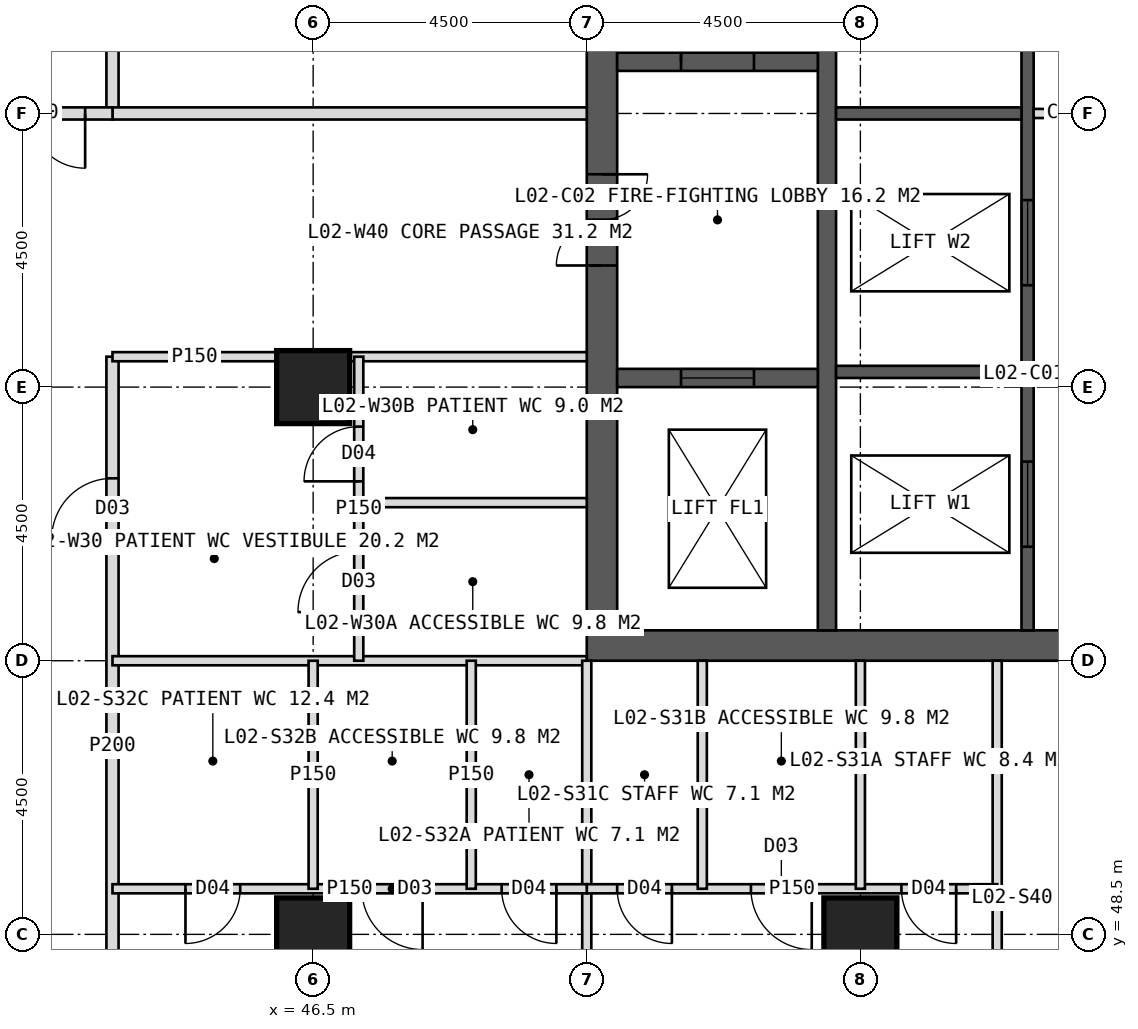
"""IFC4 building model, lengths in metres.
Left out: names, types, materials, properties, quantities, classifications, styles, units other than length and angle.
Written with IfcOpenShell. Run it as: python <this file> out.ifc"""

import sys

from ifc_helpers import new_model, si_unit, direction, frame, frame_2d, origin, origin_2d, place, context, subcontext, project, spatial, rectangle, hollow_rectangle, extrude, element, fill, save


model = new_model("IFC4")
c1 = context("Model", 3, precision=1e-05, world=origin(), true_north=direction((0.0, 1.0)))
c2 = subcontext(c1, "Body", "Model", "MODEL_VIEW")
j1 = project(units=[si_unit("LENGTHUNIT", "METRE"), si_unit("PLANEANGLEUNIT", "RADIAN")], contexts=[c1])
p1 = place(None, origin())
s1 = spatial("IfcSite", under=j1, at=p1, CompositionType="ELEMENT")
p2 = place(p1, origin())
s2 = spatial("IfcBuilding", under=s1, at=p2, CompositionType="ELEMENT")
p3 = place(p2, frame((0.0, 0.0, 11.0)))
s3 = spatial("IfcBuildingStorey", under=s2, at=p3, CompositionType="ELEMENT", Elevation=11.0)
p4 = place(p3, frame((51.0, 53.25, 0.0), z_axis=(0.0, 0.0, 1.0), x_axis=(1.0, 0.0, 0.0)))
e1 = element("IfcWall", 1, at=p4, inside=s3, PredefinedType="SHEAR", context=c2, shape_type="SweptSolid", body=[
    extrude(rectangle(XDim=18.0, YDim=0.5, at=frame_2d((9.0, 0.0))), origin(), (0.0, 0.0, 1.0), 5.5),
])
p5 = place(p4, frame((8.1, 0.0, 0.0)))
e2 = element("IfcOpeningElement", 2, at=p5, cuts=e1, PredefinedType="OPENING", context=c2, shape_type="SweptSolid", body=[
    extrude(rectangle(XDim=1.8, YDim=2.2, at=frame_2d((0.9, 1.1))), frame((0.0, 0.26, 0.0), z_axis=(0.0, -1.0, 0.0), x_axis=(1.0, 0.0, 0.0)), (0.0, 0.0, 1.0), 0.52),
])
p6 = place(p3, frame((51.25, 53.5, 0.0), z_axis=(0.0, 0.0, 1.0), x_axis=(0.0, 1.0, 0.0)))
e3 = element("IfcWall", 3, at=p6, inside=s3, PredefinedType="SHEAR", context=c2, shape_type="SweptSolid", body=[
    extrude(rectangle(XDim=17.0, YDim=0.5, at=frame_2d((8.5, 0.0))), origin(), (0.0, 0.0, 1.0), 5.5),
])
p7 = place(p6, frame((6.0, 0.0, 0.0)))
e4 = element("IfcOpeningElement", 4, at=p7, cuts=e3, PredefinedType="OPENING", context=c2, shape_type="SweptSolid", body=[
    extrude(rectangle(XDim=1.5, YDim=2.2, at=frame_2d((0.75, 1.1))), frame((0.0, 0.26, 0.0), z_axis=(0.0, -1.0, 0.0), x_axis=(1.0, 0.0, 0.0)), (0.0, 0.0, 1.0), 0.52),
])
p8 = place(p3, frame((54.95, 53.5, 0.0), z_axis=(0.0, 0.0, 1.0), x_axis=(0.0, 1.0, 0.0)))
e5 = element("IfcWall", 5, at=p8, inside=s3, PredefinedType="SHEAR", context=c2, shape_type="SweptSolid", body=[
    extrude(rectangle(XDim=17.0, YDim=0.3, at=frame_2d((8.5, 0.0))), origin(), (0.0, 0.0, 1.0), 5.5),
])
p9 = place(p3, frame((58.25, 53.5, 0.0), z_axis=(0.0, 0.0, 1.0), x_axis=(0.0, 1.0, 0.0)))
e6 = element("IfcWall", 6, at=p9, inside=s3, PredefinedType="SHEAR", context=c2, shape_type="SweptSolid", body=[
    extrude(rectangle(XDim=17.0, YDim=0.2, at=frame_2d((8.5, 0.0))), origin(), (0.0, 0.0, 1.0), 5.5),
])
p10 = place(p9, frame((1.375, 0.0, 0.0)))
e7 = element("IfcOpeningElement", 7, at=p10, cuts=e6, PredefinedType="OPENING", context=c2, shape_type="SweptSolid", body=[
    extrude(rectangle(XDim=1.4, YDim=2.2, at=frame_2d((0.7, 1.1))), frame((0.0, 0.11, 0.0), z_axis=(0.0, -1.0, 0.0), x_axis=(1.0, 0.0, 0.0)), (0.0, 0.0, 1.0), 0.22),
])
p11 = place(p9, frame((5.675, 0.0, 0.0)))
e8 = element("IfcOpeningElement", 8, at=p11, cuts=e6, PredefinedType="OPENING", context=c2, shape_type="SweptSolid", body=[
    extrude(rectangle(XDim=1.4, YDim=2.2, at=frame_2d((0.7, 1.1))), frame((0.0, 0.11, 0.0), z_axis=(0.0, -1.0, 0.0), x_axis=(1.0, 0.0, 0.0)), (0.0, 0.0, 1.0), 0.22),
])
for number, where, z_axis, x_axis in (
    (9, (55.1, 57.75, 0.0), (0.0, 0.0, 1.0), (1.0, 0.0, 0.0)),
    (10, (55.1, 62.0, 0.0), (0.0, 0.0, 1.0), (1.0, 0.0, 0.0)),
):
    element("IfcWall", number, at=place(p3, frame(where, z_axis=z_axis, x_axis=x_axis)), inside=s3, PredefinedType="SHEAR", context=c2, shape_type="SweptSolid", body=[
        extrude(rectangle(XDim=3.05, YDim=0.2, at=frame_2d((1.525, 0.0))), origin(), (0.0, 0.0, 1.0), 5.5),
    ])
p12 = place(p3, frame((51.5, 62.85, 0.0), z_axis=(0.0, 0.0, 1.0), x_axis=(1.0, 0.0, 0.0)))
e11 = element("IfcWall", 11, at=p12, inside=s3, PredefinedType="SHEAR", context=c2, shape_type="SweptSolid", body=[
    extrude(rectangle(XDim=3.3, YDim=0.3, at=frame_2d((1.65, 0.0))), origin(), (0.0, 0.0, 1.0), 5.5),
])
p13 = place(p12, frame((1.05, 0.0, 0.0)))
e12 = element("IfcOpeningElement", 12, at=p13, cuts=e11, PredefinedType="OPENING", context=c2, shape_type="SweptSolid", body=[
    extrude(rectangle(XDim=1.2, YDim=2.1, at=frame_2d((0.6, 1.05))), frame((0.0, 0.16, 0.0), z_axis=(0.0, -1.0, 0.0), x_axis=(1.0, 0.0, 0.0)), (0.0, 0.0, 1.0), 0.32),
])
p14 = place(p3, frame((51.5, 57.65, 0.0), z_axis=(0.0, 0.0, 1.0), x_axis=(1.0, 0.0, 0.0)))
e13 = element("IfcWall", 13, at=p14, inside=s3, PredefinedType="SHEAR", context=c2, shape_type="SweptSolid", body=[
    extrude(rectangle(XDim=3.3, YDim=0.3, at=frame_2d((1.65, 0.0))), origin(), (0.0, 0.0, 1.0), 5.5),
])
p15 = place(p14, frame((1.05, 0.0, 0.0)))
e14 = element("IfcOpeningElement", 14, at=p15, cuts=e13, PredefinedType="OPENING", context=c2, shape_type="SweptSolid", body=[
    extrude(rectangle(XDim=1.2, YDim=2.2, at=frame_2d((0.6, 1.1))), frame((0.0, 0.16, 0.0), z_axis=(0.0, -1.0, 0.0), x_axis=(1.0, 0.0, 0.0)), (0.0, 0.0, 1.0), 0.32),
])
for number, where, z_axis, x_axis in (
    (15, (46.5, 48.5, 0.0), (0.0, 0.0, 1.0), (1.0, 0.0, 0.0)),
    (16, (55.5, 48.5, 0.0), (0.0, 0.0, 1.0), (1.0, 0.0, 0.0)),
    (17, (46.5, 57.5, 0.0), (0.0, 0.0, 1.0), (1.0, 0.0, 0.0)),
):
    element("IfcColumn", number, at=place(p3, frame(where, z_axis=z_axis, x_axis=x_axis)), inside=s3, PredefinedType="COLUMN", context=c2, shape_type="SweptSolid", body=[
        extrude(hollow_rectangle(XDim=1.2, YDim=1.2, WallThickness=0.1, at=origin_2d()), origin(), (0.0, 0.0, 1.0), 5.5),
    ])
p16 = place(p3, frame((43.2, 45.2, 0.0), z_axis=(0.0, 0.0, 1.0), x_axis=(0.0, 1.0, 0.0)))
e18 = element("IfcWall", 18, at=p16, inside=s3, PredefinedType="PARTITIONING", context=c2, shape_type="SweptSolid", body=[
    extrude(rectangle(XDim=12.8, YDim=0.2, at=frame_2d((6.4, 0.0))), origin(), (0.0, 0.0, 1.0), 5.2),
])
p17 = place(p16, frame((9.8, 0.0, 0.0)))
e19 = element("IfcOpeningElement", 19, at=p17, cuts=e18, PredefinedType="OPENING", context=c2, shape_type="SweptSolid", body=[
    extrude(rectangle(XDim=1.0, YDim=2.1, at=frame_2d((0.5, 1.05))), frame((0.0, 0.11, 0.0), z_axis=(0.0, -1.0, 0.0), x_axis=(1.0, 0.0, 0.0)), (0.0, 0.0, 1.0), 0.22),
])
p18 = place(p3, frame((43.2, 62.0, 0.0), z_axis=(0.0, 0.0, 1.0), x_axis=(0.0, 1.0, 0.0)))
e20 = element("IfcWall", 20, at=p18, inside=s3, PredefinedType="PARTITIONING", context=c2, shape_type="SweptSolid", body=[
    extrude(rectangle(XDim=16.8, YDim=0.2, at=frame_2d((8.4, 0.0))), origin(), (0.0, 0.0, 1.0), 5.2),
])
p19 = place(p18, frame((4.0, 0.0, 0.0)))
e21 = element("IfcOpeningElement", 21, at=p19, cuts=e20, PredefinedType="OPENING", context=c2, shape_type="SweptSolid", body=[
    extrude(rectangle(XDim=1.0, YDim=2.1, at=frame_2d((0.5, 1.05))), frame((0.0, 0.11, 0.0), z_axis=(0.0, -1.0, 0.0), x_axis=(1.0, 0.0, 0.0)), (0.0, 0.0, 1.0), 0.22),
])
p20 = place(p18, frame((12.4, 0.0, 0.0)))
e22 = element("IfcOpeningElement", 22, at=p20, cuts=e20, PredefinedType="OPENING", context=c2, shape_type="SweptSolid", body=[
    extrude(rectangle(XDim=1.0, YDim=2.1, at=frame_2d((0.5, 1.05))), frame((0.0, 0.11, 0.0), z_axis=(0.0, -1.0, 0.0), x_axis=(1.0, 0.0, 0.0)), (0.0, 0.0, 1.0), 0.22),
])
p21 = place(p3, frame((51.0, 53.0, 0.0), z_axis=(0.0, 0.0, 1.0), x_axis=(-1.0, 0.0, 0.0)))
e23 = element("IfcWall", 23, at=p21, inside=s3, PredefinedType="PARTITIONING", context=c2, shape_type="SweptSolid", body=[
    extrude(rectangle(XDim=7.8, YDim=0.15, at=frame_2d((3.9, 0.0))), origin(), (0.0, 0.0, 1.0), 5.2),
])
p22 = place(p3, frame((51.0, 58.0, 0.0), z_axis=(0.0, 0.0, 1.0), x_axis=(-1.0, 0.0, 0.0)))
e24 = element("IfcWall", 24, at=p22, inside=s3, PredefinedType="PARTITIONING", context=c2, shape_type="SweptSolid", body=[
    extrude(rectangle(XDim=3.9, YDim=0.15, at=frame_2d((1.95, 0.0))), origin(), (0.0, 0.0, 1.0), 5.2),
])
p23 = place(p3, frame((45.9, 58.0, 0.0), z_axis=(0.0, 0.0, 1.0), x_axis=(-1.0, 0.0, 0.0)))
e25 = element("IfcWall", 25, at=p23, inside=s3, PredefinedType="PARTITIONING", context=c2, shape_type="SweptSolid", body=[
    extrude(rectangle(XDim=2.7, YDim=0.15, at=frame_2d((1.35, 0.0))), origin(), (0.0, 0.0, 1.0), 5.2),
])
p24 = place(p3, frame((51.0, 62.0, 0.0), z_axis=(0.0, 0.0, 1.0), x_axis=(-1.0, 0.0, 0.0)))
e26 = element("IfcWall", 26, at=p24, inside=s3, PredefinedType="SOLIDWALL", context=c2, shape_type="SweptSolid", body=[
    extrude(rectangle(XDim=7.8, YDim=0.2, at=frame_2d((3.9, 0.0))), origin(), (0.0, 0.0, 1.0), 4.4),
])
p25 = place(p3, frame((47.25, 53.0, 0.0), z_axis=(0.0, 0.0, 1.0), x_axis=(0.0, 1.0, 0.0)))
e27 = element("IfcWall", 27, at=p25, inside=s3, PredefinedType="PARTITIONING", context=c2, shape_type="SweptSolid", body=[
    extrude(rectangle(XDim=5.0, YDim=0.15, at=frame_2d((2.5, 0.0))), origin(), (0.0, 0.0, 1.0), 5.2),
])
p26 = place(p25, frame((0.8, 0.0, 0.0)))
e28 = element("IfcOpeningElement", 28, at=p26, cuts=e27, PredefinedType="OPENING", context=c2, shape_type="SweptSolid", body=[
    extrude(rectangle(XDim=1.0, YDim=2.1, at=frame_2d((0.5, 1.05))), frame((0.0, 0.085, 0.0), z_axis=(0.0, -1.0, 0.0), x_axis=(1.0, 0.0, 0.0)), (0.0, 0.0, 1.0), 0.17),
])
p27 = place(p25, frame((2.95, 0.0, 0.0)))
e29 = element("IfcOpeningElement", 29, at=p27, cuts=e27, PredefinedType="OPENING", context=c2, shape_type="SweptSolid", body=[
    extrude(rectangle(XDim=0.9, YDim=2.1, at=frame_2d((0.45, 1.05))), frame((0.0, 0.085, 0.0), z_axis=(0.0, -1.0, 0.0), x_axis=(1.0, 0.0, 0.0)), (0.0, 0.0, 1.0), 0.17),
])
p28 = place(p3, frame((51.0, 55.6, 0.0), z_axis=(0.0, 0.0, 1.0), x_axis=(-1.0, 0.0, 0.0)))
e30 = element("IfcWall", 30, at=p28, inside=s3, PredefinedType="PARTITIONING", context=c2, shape_type="SweptSolid", body=[
    extrude(rectangle(XDim=3.75, YDim=0.15, at=frame_2d((1.875, 0.0))), origin(), (0.0, 0.0, 1.0), 5.2),
])
for number, where, z_axis, x_axis in (
    (31, (57.75, 53.0, 0.0), (0.0, 0.0, 1.0), (0.0, -1.0, 0.0)),
    (32, (51.0, 53.0, 0.0), (0.0, 0.0, 1.0), (0.0, -1.0, 0.0)),
):
    element("IfcWall", number, at=place(p3, frame(where, z_axis=z_axis, x_axis=x_axis)), inside=s3, PredefinedType="PARTITIONING", context=c2, shape_type="SweptSolid", body=[
        extrude(rectangle(XDim=7.8, YDim=0.15, at=frame_2d((3.9, 0.0))), origin(), (0.0, 0.0, 1.0), 5.2),
    ])
p29 = place(p3, frame((57.75, 49.25, 0.0), z_axis=(0.0, 0.0, 1.0), x_axis=(-1.0, 0.0, 0.0)))
e33 = element("IfcWall", 33, at=p29, inside=s3, PredefinedType="PARTITIONING", context=c2, shape_type="SweptSolid", body=[
    extrude(rectangle(XDim=6.75, YDim=0.15, at=frame_2d((3.375, 0.0))), origin(), (0.0, 0.0, 1.0), 5.2),
])
p30 = place(p29, frame((0.675, 0.0, 0.0)))
e34 = element("IfcOpeningElement", 34, at=p30, cuts=e33, PredefinedType="OPENING", context=c2, shape_type="SweptSolid", body=[
    extrude(rectangle(XDim=0.9, YDim=2.1, at=frame_2d((0.45, 1.05))), frame((0.0, 0.085, 0.0), z_axis=(0.0, -1.0, 0.0), x_axis=(1.0, 0.0, 0.0)), (0.0, 0.0, 1.0), 0.17),
])
p31 = place(p29, frame((3.05, 0.0, 0.0)))
e35 = element("IfcOpeningElement", 35, at=p31, cuts=e33, PredefinedType="OPENING", context=c2, shape_type="SweptSolid", body=[
    extrude(rectangle(XDim=1.0, YDim=2.1, at=frame_2d((0.5, 1.05))), frame((0.0, 0.085, 0.0), z_axis=(0.0, -1.0, 0.0), x_axis=(1.0, 0.0, 0.0)), (0.0, 0.0, 1.0), 0.17),
])
p32 = place(p29, frame((5.35, 0.0, 0.0)))
e36 = element("IfcOpeningElement", 36, at=p32, cuts=e33, PredefinedType="OPENING", context=c2, shape_type="SweptSolid", body=[
    extrude(rectangle(XDim=0.9, YDim=2.1, at=frame_2d((0.45, 1.05))), frame((0.0, 0.085, 0.0), z_axis=(0.0, -1.0, 0.0), x_axis=(1.0, 0.0, 0.0)), (0.0, 0.0, 1.0), 0.17),
])
p33 = place(p3, frame((55.5, 53.0, 0.0), z_axis=(0.0, 0.0, 1.0), x_axis=(0.0, -1.0, 0.0)))
e37 = element("IfcWall", 37, at=p33, inside=s3, PredefinedType="PARTITIONING", context=c2, shape_type="SweptSolid", body=[
    extrude(rectangle(XDim=3.75, YDim=0.15, at=frame_2d((1.875, 0.0))), origin(), (0.0, 0.0, 1.0), 4.3),
])
p34 = place(p3, frame((52.9, 53.0, 0.0), z_axis=(0.0, 0.0, 1.0), x_axis=(0.0, -1.0, 0.0)))
e38 = element("IfcWall", 38, at=p34, inside=s3, PredefinedType="PARTITIONING", context=c2, shape_type="SweptSolid", body=[
    extrude(rectangle(XDim=3.75, YDim=0.15, at=frame_2d((1.875, 0.0))), origin(), (0.0, 0.0, 1.0), 5.2),
])
p35 = place(p3, frame((51.0, 49.25, 0.0), z_axis=(0.0, 0.0, 1.0), x_axis=(-1.0, 0.0, 0.0)))
e39 = element("IfcWall", 39, at=p35, inside=s3, PredefinedType="PARTITIONING", context=c2, shape_type="SweptSolid", body=[
    extrude(rectangle(XDim=7.8, YDim=0.15, at=frame_2d((3.9, 0.0))), origin(), (0.0, 0.0, 1.0), 5.2),
])
p36 = place(p35, frame((0.5, 0.0, 0.0)))
e40 = element("IfcOpeningElement", 40, at=p36, cuts=e39, PredefinedType="OPENING", context=c2, shape_type="SweptSolid", body=[
    extrude(rectangle(XDim=0.9, YDim=2.1, at=frame_2d((0.45, 1.05))), frame((0.0, 0.085, 0.0), z_axis=(0.0, -1.0, 0.0), x_axis=(1.0, 0.0, 0.0)), (0.0, 0.0, 1.0), 0.17),
])
p37 = place(p35, frame((2.7, 0.0, 0.0)))
e41 = element("IfcOpeningElement", 41, at=p37, cuts=e39, PredefinedType="OPENING", context=c2, shape_type="SweptSolid", body=[
    extrude(rectangle(XDim=1.0, YDim=2.1, at=frame_2d((0.5, 1.05))), frame((0.0, 0.085, 0.0), z_axis=(0.0, -1.0, 0.0), x_axis=(1.0, 0.0, 0.0)), (0.0, 0.0, 1.0), 0.17),
])
p38 = place(p35, frame((5.7, 0.0, 0.0)))
e42 = element("IfcOpeningElement", 42, at=p38, cuts=e39, PredefinedType="OPENING", context=c2, shape_type="SweptSolid", body=[
    extrude(rectangle(XDim=0.9, YDim=2.1, at=frame_2d((0.45, 1.05))), frame((0.0, 0.085, 0.0), z_axis=(0.0, -1.0, 0.0), x_axis=(1.0, 0.0, 0.0)), (0.0, 0.0, 1.0), 0.17),
])
p39 = place(p3, frame((49.1, 53.0, 0.0), z_axis=(0.0, 0.0, 1.0), x_axis=(0.0, -1.0, 0.0)))
e43 = element("IfcWall", 43, at=p39, inside=s3, PredefinedType="PARTITIONING", context=c2, shape_type="SweptSolid", body=[
    extrude(rectangle(XDim=3.75, YDim=0.15, at=frame_2d((1.875, 0.0))), origin(), (0.0, 0.0, 1.0), 5.2),
])
p40 = place(p3, frame((46.5, 53.0, 0.0), z_axis=(0.0, 0.0, 1.0), x_axis=(0.0, -1.0, 0.0)))
e44 = element("IfcWall", 44, at=p40, inside=s3, PredefinedType="PARTITIONING", context=c2, shape_type="SweptSolid", body=[
    extrude(rectangle(XDim=3.75, YDim=0.15, at=frame_2d((1.875, 0.0))), origin(), (0.0, 0.0, 1.0), 4.4),
])
p41 = place(p3, frame((43.2, 62.0, 0.0), z_axis=(0.0, 0.0, 1.0), x_axis=(-1.0, 0.0, 0.0)))
e45 = element("IfcWall", 45, at=p41, inside=s3, PredefinedType="SOLIDWALL", context=c2, shape_type="SweptSolid", body=[
    extrude(rectangle(XDim=2.7, YDim=0.2, at=frame_2d((1.35, 0.0))), origin(), (0.0, 0.0, 1.0), 4.4),
])
p42 = place(p41, frame((0.45, 0.0, 0.0)))
e46 = element("IfcOpeningElement", 46, at=p42, cuts=e45, PredefinedType="OPENING", context=c2, shape_type="SweptSolid", body=[
    extrude(rectangle(XDim=1.8, YDim=2.2, at=frame_2d((0.9, 1.1))), frame((0.0, 0.11, 0.0), z_axis=(0.0, -1.0, 0.0), x_axis=(1.0, 0.0, 0.0)), (0.0, 0.0, 1.0), 0.22),
])
p43 = place(p3, frame((58.35, 62.0, 0.0), z_axis=(0.0, 0.0, 1.0), x_axis=(1.0, 0.0, 0.0)))
e47 = element("IfcWall", 47, at=p43, inside=s3, PredefinedType="PARTITIONING", context=c2, shape_type="SweptSolid", body=[
    extrude(rectangle(XDim=3.3, YDim=0.15, at=frame_2d((1.65, 0.0))), origin(), (0.0, 0.0, 1.0), 5.2),
])
p44 = place(p43, frame((1.15, 0.0, 0.0)))
e48 = element("IfcOpeningElement", 48, at=p44, cuts=e47, PredefinedType="OPENING", context=c2, shape_type="SweptSolid", body=[
    extrude(rectangle(XDim=1.0, YDim=2.1, at=frame_2d((0.5, 1.05))), frame((0.0, 0.085, 0.0), z_axis=(0.0, -1.0, 0.0), x_axis=(1.0, 0.0, 0.0)), (0.0, 0.0, 1.0), 0.17),
])
p45 = place(p17, origin())
e49 = element("IfcDoor", 49, at=p45, inside=s3, OperationType="SINGLE_SWING_LEFT", PredefinedType="DOOR", context=c2, shape_type="SweptSolid", body=[
    extrude(rectangle(XDim=1.0, YDim=2.1, at=frame_2d((0.5, 1.05))), frame((0.0, 0.025, 0.0), z_axis=(0.0, -1.0, 0.0), x_axis=(1.0, 0.0, 0.0)), (0.0, 0.0, 1.0), 0.05),
])
fill(e19, e49)
p46 = place(p42, origin())
e50 = element("IfcDoor", 50, at=p46, inside=s3, OperationType="DOUBLE_DOOR_DOUBLE_SWING", PredefinedType="DOOR", context=c2, shape_type="SweptSolid", body=[
    extrude(rectangle(XDim=1.8, YDim=2.2, at=frame_2d((0.9, 1.1))), frame((0.0, 0.025, 0.0), z_axis=(0.0, -1.0, 0.0), x_axis=(1.0, 0.0, 0.0)), (0.0, 0.0, 1.0), 0.05),
])
fill(e46, e50)
p47 = place(p7, origin())
e51 = element("IfcDoor", 51, at=p47, inside=s3, OperationType="DOUBLE_DOOR_SINGLE_SWING", PredefinedType="DOOR", context=c2, shape_type="SweptSolid", body=[
    extrude(rectangle(XDim=1.5, YDim=2.2, at=frame_2d((0.75, 1.1))), frame((0.0, 0.025, 0.0), z_axis=(0.0, -1.0, 0.0), x_axis=(1.0, 0.0, 0.0)), (0.0, 0.0, 1.0), 0.05),
])
fill(e4, e51)
p48 = place(p13, origin())
e52 = element("IfcDoor", 52, at=p48, inside=s3, OperationType="SINGLE_SWING_LEFT", PredefinedType="DOOR", context=c2, shape_type="SweptSolid", body=[
    extrude(rectangle(XDim=1.2, YDim=2.1, at=frame_2d((0.6, 1.05))), frame((0.0, 0.025, 0.0), z_axis=(0.0, -1.0, 0.0), x_axis=(1.0, 0.0, 0.0)), (0.0, 0.0, 1.0), 0.05),
])
fill(e12, e52)
p49 = place(p15, origin())
e53 = element("IfcDoor", 53, at=p49, inside=s3, OperationType="SLIDING_TO_LEFT", PredefinedType="DOOR", context=c2, shape_type="SweptSolid", body=[
    extrude(rectangle(XDim=1.2, YDim=2.2, at=frame_2d((0.6, 1.1))), frame((0.0, 0.025, 0.0), z_axis=(0.0, -1.0, 0.0), x_axis=(1.0, 0.0, 0.0)), (0.0, 0.0, 1.0), 0.05),
])
fill(e14, e53)
p50 = place(p10, origin())
e54 = element("IfcDoor", 54, at=p50, inside=s3, OperationType="SLIDING_TO_LEFT", PredefinedType="DOOR", context=c2, shape_type="SweptSolid", body=[
    extrude(rectangle(XDim=1.4, YDim=2.2, at=frame_2d((0.7, 1.1))), frame((0.0, 0.025, 0.0), z_axis=(0.0, -1.0, 0.0), x_axis=(1.0, 0.0, 0.0)), (0.0, 0.0, 1.0), 0.05),
])
fill(e7, e54)
p51 = place(p11, origin())
e55 = element("IfcDoor", 55, at=p51, inside=s3, OperationType="SLIDING_TO_LEFT", PredefinedType="DOOR", context=c2, shape_type="SweptSolid", body=[
    extrude(rectangle(XDim=1.4, YDim=2.2, at=frame_2d((0.7, 1.1))), frame((0.0, 0.025, 0.0), z_axis=(0.0, -1.0, 0.0), x_axis=(1.0, 0.0, 0.0)), (0.0, 0.0, 1.0), 0.05),
])
fill(e8, e55)
p52 = place(p26, origin())
e56 = element("IfcDoor", 56, at=p52, inside=s3, OperationType="SINGLE_SWING_LEFT", PredefinedType="DOOR", context=c2, shape_type="SweptSolid", body=[
    extrude(rectangle(XDim=1.0, YDim=2.1, at=frame_2d((0.5, 1.05))), frame((0.0, 0.025, 0.0), z_axis=(0.0, -1.0, 0.0), x_axis=(1.0, 0.0, 0.0)), (0.0, 0.0, 1.0), 0.05),
])
fill(e28, e56)
p53 = place(p27, origin())
e57 = element("IfcDoor", 57, at=p53, inside=s3, OperationType="SINGLE_SWING_LEFT", PredefinedType="DOOR", context=c2, shape_type="SweptSolid", body=[
    extrude(rectangle(XDim=0.9, YDim=2.1, at=frame_2d((0.45, 1.05))), frame((0.0, 0.025, 0.0), z_axis=(0.0, -1.0, 0.0), x_axis=(1.0, 0.0, 0.0)), (0.0, 0.0, 1.0), 0.05),
])
fill(e29, e57)
p54 = place(p30, origin())
e58 = element("IfcDoor", 58, at=p54, inside=s3, OperationType="SINGLE_SWING_LEFT", PredefinedType="DOOR", context=c2, shape_type="SweptSolid", body=[
    extrude(rectangle(XDim=0.9, YDim=2.1, at=frame_2d((0.45, 1.05))), frame((0.0, 0.025, 0.0), z_axis=(0.0, -1.0, 0.0), x_axis=(1.0, 0.0, 0.0)), (0.0, 0.0, 1.0), 0.05),
])
fill(e34, e58)
p55 = place(p31, origin())
e59 = element("IfcDoor", 59, at=p55, inside=s3, OperationType="SINGLE_SWING_LEFT", PredefinedType="DOOR", context=c2, shape_type="SweptSolid", body=[
    extrude(rectangle(XDim=1.0, YDim=2.1, at=frame_2d((0.5, 1.05))), frame((0.0, 0.025, 0.0), z_axis=(0.0, -1.0, 0.0), x_axis=(1.0, 0.0, 0.0)), (0.0, 0.0, 1.0), 0.05),
])
fill(e35, e59)
p56 = place(p32, origin())
e60 = element("IfcDoor", 60, at=p56, inside=s3, OperationType="SINGLE_SWING_LEFT", PredefinedType="DOOR", context=c2, shape_type="SweptSolid", body=[
    extrude(rectangle(XDim=0.9, YDim=2.1, at=frame_2d((0.45, 1.05))), frame((0.0, 0.025, 0.0), z_axis=(0.0, -1.0, 0.0), x_axis=(1.0, 0.0, 0.0)), (0.0, 0.0, 1.0), 0.05),
])
fill(e36, e60)
p57 = place(p36, origin())
e61 = element("IfcDoor", 61, at=p57, inside=s3, OperationType="SINGLE_SWING_LEFT", PredefinedType="DOOR", context=c2, shape_type="SweptSolid", body=[
    extrude(rectangle(XDim=0.9, YDim=2.1, at=frame_2d((0.45, 1.05))), frame((0.0, 0.025, 0.0), z_axis=(0.0, -1.0, 0.0), x_axis=(1.0, 0.0, 0.0)), (0.0, 0.0, 1.0), 0.05),
])
fill(e40, e61)
p58 = place(p37, origin())
e62 = element("IfcDoor", 62, at=p58, inside=s3, OperationType="SINGLE_SWING_LEFT", PredefinedType="DOOR", context=c2, shape_type="SweptSolid", body=[
    extrude(rectangle(XDim=1.0, YDim=2.1, at=frame_2d((0.5, 1.05))), frame((0.0, 0.025, 0.0), z_axis=(0.0, -1.0, 0.0), x_axis=(1.0, 0.0, 0.0)), (0.0, 0.0, 1.0), 0.05),
])
fill(e41, e62)
p59 = place(p38, origin())
e63 = element("IfcDoor", 63, at=p59, inside=s3, OperationType="SINGLE_SWING_RIGHT", PredefinedType="DOOR", context=c2, shape_type="SweptSolid", body=[
    extrude(rectangle(XDim=0.9, YDim=2.1, at=frame_2d((0.45, 1.05))), frame((0.0, 0.025, 0.0), z_axis=(0.0, -1.0, 0.0), x_axis=(1.0, 0.0, 0.0)), (0.0, 0.0, 1.0), 0.05),
])
fill(e42, e63)
save(model, sys.argv[1])
